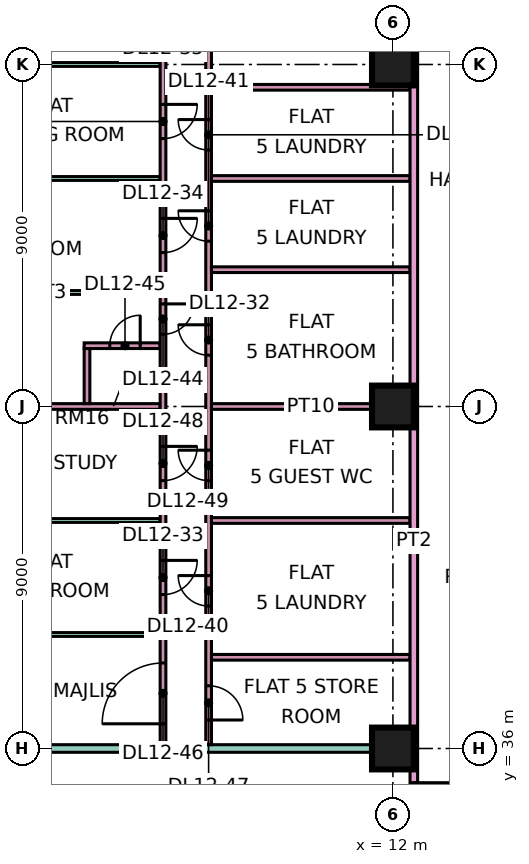
"""IFC4 building model, lengths in metres.
Left out: names, types, materials, properties, quantities, classifications, styles, units other than length and angle.
Written with IfcOpenShell. Run it as: python <this file> out.ifc"""

import sys

from ifc_helpers import new_model, si_unit, direction, frame, frame_2d, origin, origin_2d, place, context, subcontext, project, spatial, rectangle, extrude, element, fill, save


model = new_model("IFC4")
c1 = context("Model", 3, precision=1e-05, world=origin(), true_north=direction((0.0, 1.0)))
c2 = subcontext(c1, "Body", "Model", "MODEL_VIEW")
j1 = project(units=[si_unit("LENGTHUNIT", "METRE"), si_unit("PLANEANGLEUNIT", "RADIAN")], contexts=[c1])
p1 = place(None, origin())
s1 = spatial("IfcSite", under=j1, at=p1, CompositionType="ELEMENT")
p2 = place(p1, origin())
s2 = spatial("IfcBuilding", under=s1, at=p2, CompositionType="ELEMENT")
p3 = place(p2, frame((0.0, 0.0, 60.15)))
s3 = spatial("IfcBuildingStorey", under=s2, at=p3, CompositionType="ELEMENT", Elevation=60.15)
for number, where, z_axis, x_axis in (
    (1, (12.0, 36.0, 0.0), (0.0, 0.0, 1.0), (1.0, 0.0, 0.0)),
    (2, (12.0, 45.0, 0.0), (0.0, 0.0, 1.0), (1.0, 0.0, 0.0)),
    (3, (12.0, 54.0, 0.0), (0.0, 0.0, 1.0), (1.0, 0.0, 0.0)),
):
    element("IfcColumn", number, at=place(p3, frame(where, z_axis=z_axis, x_axis=x_axis)), inside=s3, PredefinedType="COLUMN", context=c2, shape_type="SweptSolid", body=[
        extrude(rectangle(XDim=1.1, YDim=1.1, at=origin_2d()), origin(), (0.0, 0.0, 1.0), 3.75),
    ])
p4 = place(p3, frame((0.0, 36.0, 0.0), z_axis=(0.0, 0.0, 1.0), x_axis=(1.0, 0.0, 0.0)))
e4 = element("IfcWall", 4, at=p4, inside=s3, PredefinedType="PARTITIONING", context=c2, shape_type="SweptSolid", body=[
    extrude(rectangle(XDim=12.45, YDim=0.2, at=frame_2d((6.225, 0.0))), origin(), (0.0, 0.0, 1.0), 3.35),
])
p5 = place(p3, frame((0.0, 48.0, 0.0), z_axis=(0.0, 0.0, 1.0), x_axis=(1.0, 0.0, 0.0)))
e5 = element("IfcWall", 5, at=p5, inside=s3, PredefinedType="PARTITIONING", context=c2, shape_type="SweptSolid", body=[
    extrude(rectangle(XDim=5.875, YDim=0.1, at=frame_2d((2.938, 0.0))), origin(), (0.0, 0.0, 1.0), 3.35),
])
p6 = place(p3, frame((-1.35, 51.0, 0.0), z_axis=(0.0, 0.0, 1.0), x_axis=(1.0, 0.0, 0.0)))
e6 = element("IfcWall", 6, at=p6, inside=s3, PredefinedType="PARTITIONING", context=c2, shape_type="SweptSolid", body=[
    extrude(rectangle(XDim=7.225, YDim=0.1, at=frame_2d((3.613, 0.0))), origin(), (0.0, 0.0, 1.0), 3.35),
])
p7 = place(p3, frame((0.0, 54.0, 0.0), z_axis=(0.0, 0.0, 1.0), x_axis=(1.0, 0.0, 0.0)))
e7 = element("IfcWall", 7, at=p7, inside=s3, PredefinedType="PARTITIONING", context=c2, shape_type="SweptSolid", body=[
    extrude(rectangle(XDim=5.875, YDim=0.1, at=frame_2d((2.938, 0.0))), origin(), (0.0, 0.0, 1.0), 3.35),
])
for number, where, z_axis, x_axis in (
    (8, (0.074, 39.0, 0.0), (0.0, 0.0, 1.0), (1.0, 0.0, 0.0)),
    (9, (0.074, 42.0, 0.0), (0.0, 0.0, 1.0), (1.0, 0.0, 0.0)),
):
    element("IfcWall", number, at=place(p3, frame(where, z_axis=z_axis, x_axis=x_axis)), inside=s3, PredefinedType="PARTITIONING", context=c2, shape_type="SweptSolid", body=[
        extrude(rectangle(XDim=5.801, YDim=0.1, at=frame_2d((2.9, 0.0))), origin(), (0.0, 0.0, 1.0), 3.35),
    ])
p8 = place(p3, frame((0.074, 45.0, 0.0), z_axis=(0.0, 0.0, 1.0), x_axis=(1.0, 0.0, 0.0)))
e10 = element("IfcWall", 10, at=p8, inside=s3, PredefinedType="PARTITIONING", context=c2, shape_type="SweptSolid", body=[
    extrude(rectangle(XDim=5.801, YDim=0.15, at=frame_2d((2.9, 0.0))), origin(), (0.0, 0.0, 1.0), 3.35),
])
p9 = place(p3, frame((3.875, 46.6, 0.0), z_axis=(0.0, 0.0, 1.0), x_axis=(1.0, 0.0, 0.0)))
e11 = element("IfcWall", 11, at=p9, inside=s3, PredefinedType="PARTITIONING", context=c2, shape_type="SweptSolid", body=[
    extrude(rectangle(XDim=2.0, YDim=0.15, at=frame_2d((1.0, 0.0))), origin(), (0.0, 0.0, 1.0), 3.35),
])
p10 = place(p9, frame((0.675, 0.0, 0.0)))
e12 = element("IfcOpeningElement", 12, at=p10, cuts=e11, PredefinedType="OPENING", context=c2, shape_type="SweptSolid", body=[
    extrude(rectangle(XDim=0.8, YDim=2.1, at=frame_2d((0.4, 1.05))), frame((0.0, 0.085, 0.0), z_axis=(0.0, -1.0, 0.0), x_axis=(1.0, 0.0, 0.0)), (0.0, 0.0, 1.0), 0.17),
])
p11 = place(p3, frame((3.95, 45.075, 0.0), z_axis=(0.0, 0.0, 1.0), x_axis=(0.0, 1.0, 0.0)))
e13 = element("IfcWall", 13, at=p11, inside=s3, PredefinedType="PARTITIONING", context=c2, shape_type="SweptSolid", body=[
    extrude(rectangle(XDim=1.45, YDim=0.15, at=frame_2d((0.725, 0.0))), origin(), (0.0, 0.0, 1.0), 3.35),
])
p12 = place(p3, frame((5.95, 36.1, 0.0), z_axis=(0.0, 0.0, 1.0), x_axis=(0.0, 1.0, 0.0)))
e14 = element("IfcWall", 14, at=p12, inside=s3, PredefinedType="PARTITIONING", context=c2, shape_type="SweptSolid", body=[
    extrude(rectangle(XDim=28.25, YDim=0.15, at=frame_2d((14.125, 0.0))), origin(), (0.0, 0.0, 1.0), 3.35),
])
p13 = place(p12, frame((3.95, 0.0, 0.0)))
e15 = element("IfcOpeningElement", 15, at=p13, cuts=e14, PredefinedType="OPENING", context=c2, shape_type="SweptSolid", body=[
    extrude(rectangle(XDim=0.9, YDim=2.1, at=frame_2d((0.45, 1.05))), frame((0.0, 0.085, 0.0), z_axis=(0.0, -1.0, 0.0), x_axis=(1.0, 0.0, 0.0)), (0.0, 0.0, 1.0), 0.17),
])
p14 = place(p12, frame((12.95, 0.0, 0.0)))
e16 = element("IfcOpeningElement", 16, at=p14, cuts=e14, PredefinedType="OPENING", context=c2, shape_type="SweptSolid", body=[
    extrude(rectangle(XDim=0.9, YDim=2.1, at=frame_2d((0.45, 1.05))), frame((0.0, 0.085, 0.0), z_axis=(0.0, -1.0, 0.0), x_axis=(1.0, 0.0, 0.0)), (0.0, 0.0, 1.0), 0.17),
])
p15 = place(p12, frame((18.95, 0.0, 0.0)))
e17 = element("IfcOpeningElement", 17, at=p15, cuts=e14, PredefinedType="OPENING", context=c2, shape_type="SweptSolid", body=[
    extrude(rectangle(XDim=0.9, YDim=2.1, at=frame_2d((0.45, 1.05))), frame((0.0, 0.085, 0.0), z_axis=(0.0, -1.0, 0.0), x_axis=(1.0, 0.0, 0.0)), (0.0, 0.0, 1.0), 0.17),
])
p16 = place(p12, frame((21.95, 0.0, 0.0)))
e18 = element("IfcOpeningElement", 18, at=p16, cuts=e14, PredefinedType="OPENING", context=c2, shape_type="SweptSolid", body=[
    extrude(rectangle(XDim=0.9, YDim=2.1, at=frame_2d((0.45, 1.05))), frame((0.0, 0.085, 0.0), z_axis=(0.0, -1.0, 0.0), x_axis=(1.0, 0.0, 0.0)), (0.0, 0.0, 1.0), 0.17),
])
p17 = place(p12, frame((24.95, 0.0, 0.0)))
e19 = element("IfcOpeningElement", 19, at=p17, cuts=e14, PredefinedType="OPENING", context=c2, shape_type="SweptSolid", body=[
    extrude(rectangle(XDim=0.9, YDim=2.1, at=frame_2d((0.45, 1.05))), frame((0.0, 0.085, 0.0), z_axis=(0.0, -1.0, 0.0), x_axis=(1.0, 0.0, 0.0)), (0.0, 0.0, 1.0), 0.17),
])
p18 = place(p12, frame((15.95, 0.0, 0.0)))
e20 = element("IfcOpeningElement", 20, at=p18, cuts=e14, PredefinedType="OPENING", context=c2, shape_type="SweptSolid", body=[
    extrude(rectangle(XDim=0.9, YDim=2.1, at=frame_2d((0.45, 1.05))), frame((0.0, 0.085, 0.0), z_axis=(0.0, -1.0, 0.0), x_axis=(1.0, 0.0, 0.0)), (0.0, 0.0, 1.0), 0.17),
])
p19 = place(p12, frame((10.8, 0.0, 0.0)))
e21 = element("IfcOpeningElement", 21, at=p19, cuts=e14, PredefinedType="OPENING", context=c2, shape_type="SweptSolid", body=[
    extrude(rectangle(XDim=0.8, YDim=2.1, at=frame_2d((0.4, 1.05))), frame((0.0, 0.085, 0.0), z_axis=(0.0, -1.0, 0.0), x_axis=(1.0, 0.0, 0.0)), (0.0, 0.0, 1.0), 0.17),
])
p20 = place(p12, frame((0.55, 0.0, 0.0)))
e22 = element("IfcOpeningElement", 22, at=p20, cuts=e14, PredefinedType="OPENING", context=c2, shape_type="SweptSolid", body=[
    extrude(rectangle(XDim=1.6, YDim=2.1, at=frame_2d((0.8, 1.05))), frame((0.0, 0.085, 0.0), z_axis=(0.0, -1.0, 0.0), x_axis=(1.0, 0.0, 0.0)), (0.0, 0.0, 1.0), 0.17),
])
p21 = place(p12, frame((6.95, 0.0, 0.0)))
e23 = element("IfcOpeningElement", 23, at=p21, cuts=e14, PredefinedType="OPENING", context=c2, shape_type="SweptSolid", body=[
    extrude(rectangle(XDim=0.9, YDim=2.1, at=frame_2d((0.45, 1.05))), frame((0.0, 0.085, 0.0), z_axis=(0.0, -1.0, 0.0), x_axis=(1.0, 0.0, 0.0)), (0.0, 0.0, 1.0), 0.17),
])
p22 = place(p3, frame((7.15, 36.1, 0.0), z_axis=(0.0, 0.0, 1.0), x_axis=(0.0, 1.0, 0.0)))
e24 = element("IfcWall", 24, at=p22, inside=s3, PredefinedType="PARTITIONING", context=c2, shape_type="SweptSolid", body=[
    extrude(rectangle(XDim=23.35, YDim=0.15, at=frame_2d((11.675, 0.0))), origin(), (0.0, 0.0, 1.0), 3.35),
])
p23 = place(p22, frame((10.25, 0.0, 0.0)))
e25 = element("IfcOpeningElement", 25, at=p23, cuts=e24, PredefinedType="OPENING", context=c2, shape_type="SweptSolid", body=[
    extrude(rectangle(XDim=0.8, YDim=2.1, at=frame_2d((0.4, 1.05))), frame((0.0, 0.085, 0.0), z_axis=(0.0, -1.0, 0.0), x_axis=(1.0, 0.0, 0.0)), (0.0, 0.0, 1.0), 0.17),
])
p24 = place(p22, frame((19.85, 0.0, 0.0)))
e26 = element("IfcOpeningElement", 26, at=p24, cuts=e24, PredefinedType="OPENING", context=c2, shape_type="SweptSolid", body=[
    extrude(rectangle(XDim=0.9, YDim=2.1, at=frame_2d((0.45, 1.05))), frame((0.0, 0.085, 0.0), z_axis=(0.0, -1.0, 0.0), x_axis=(1.0, 0.0, 0.0)), (0.0, 0.0, 1.0), 0.17),
])
p25 = place(p22, frame((3.65, 0.0, 0.0)))
e27 = element("IfcOpeningElement", 27, at=p25, cuts=e24, PredefinedType="OPENING", context=c2, shape_type="SweptSolid", body=[
    extrude(rectangle(XDim=0.8, YDim=2.1, at=frame_2d((0.4, 1.05))), frame((0.0, 0.085, 0.0), z_axis=(0.0, -1.0, 0.0), x_axis=(1.0, 0.0, 0.0)), (0.0, 0.0, 1.0), 0.17),
])
p26 = place(p22, frame((13.25, 0.0, 0.0)))
e28 = element("IfcOpeningElement", 28, at=p26, cuts=e24, PredefinedType="OPENING", context=c2, shape_type="SweptSolid", body=[
    extrude(rectangle(XDim=0.8, YDim=2.1, at=frame_2d((0.4, 1.05))), frame((0.0, 0.085, 0.0), z_axis=(0.0, -1.0, 0.0), x_axis=(1.0, 0.0, 0.0)), (0.0, 0.0, 1.0), 0.17),
])
p27 = place(p22, frame((15.65, 0.0, 0.0)))
e29 = element("IfcOpeningElement", 29, at=p27, cuts=e24, PredefinedType="OPENING", context=c2, shape_type="SweptSolid", body=[
    extrude(rectangle(XDim=0.8, YDim=2.1, at=frame_2d((0.4, 1.05))), frame((0.0, 0.085, 0.0), z_axis=(0.0, -1.0, 0.0), x_axis=(1.0, 0.0, 0.0)), (0.0, 0.0, 1.0), 0.17),
])
p28 = place(p22, frame((0.65, 0.0, 0.0)))
e30 = element("IfcOpeningElement", 30, at=p28, cuts=e24, PredefinedType="OPENING", context=c2, shape_type="SweptSolid", body=[
    extrude(rectangle(XDim=0.9, YDim=2.1, at=frame_2d((0.45, 1.05))), frame((0.0, 0.085, 0.0), z_axis=(0.0, -1.0, 0.0), x_axis=(1.0, 0.0, 0.0)), (0.0, 0.0, 1.0), 0.17),
])
p29 = place(p22, frame((6.95, 0.0, 0.0)))
e31 = element("IfcOpeningElement", 31, at=p29, cuts=e24, PredefinedType="OPENING", context=c2, shape_type="SweptSolid", body=[
    extrude(rectangle(XDim=0.8, YDim=2.1, at=frame_2d((0.4, 1.05))), frame((0.0, 0.085, 0.0), z_axis=(0.0, -1.0, 0.0), x_axis=(1.0, 0.0, 0.0)), (0.0, 0.0, 1.0), 0.17),
])
for number, where, z_axis, x_axis in (
    (32, (7.225, 38.4, 0.0), (0.0, 0.0, 1.0), (1.0, 0.0, 0.0)),
    (33, (7.225, 42.0, 0.0), (0.0, 0.0, 1.0), (1.0, 0.0, 0.0)),
    (34, (7.225, 45.0, 0.0), (0.0, 0.0, 1.0), (1.0, 0.0, 0.0)),
    (35, (7.225, 48.6, 0.0), (0.0, 0.0, 1.0), (1.0, 0.0, 0.0)),
    (36, (7.225, 51.0, 0.0), (0.0, 0.0, 1.0), (1.0, 0.0, 0.0)),
    (37, (7.225, 53.4, 0.0), (0.0, 0.0, 1.0), (1.0, 0.0, 0.0)),
):
    element("IfcWall", number, at=place(p3, frame(where, z_axis=z_axis, x_axis=x_axis)), inside=s3, PredefinedType="PARTITIONING", context=c2, shape_type="SweptSolid", body=[
        extrude(rectangle(XDim=5.225, YDim=0.15, at=frame_2d((2.612, 0.0))), origin(), (0.0, 0.0, 1.0), 3.35),
    ])
p30 = place(p3, frame((12.55, 20.0, 0.0), z_axis=(0.0, 0.0, 1.0), x_axis=(0.0, 1.0, 0.0)))
e38 = element("IfcWall", 38, at=p30, inside=s3, PredefinedType="PARTITIONING", context=c2, shape_type="SweptSolid", body=[
    extrude(rectangle(XDim=42.926, YDim=0.2, at=frame_2d((21.463, 0.0))), origin(), (0.0, 0.0, 1.0), 3.35),
])
p31 = place(p30, frame((40.65, 0.0, 0.0)))
e39 = element("IfcOpeningElement", 39, at=p31, cuts=e38, PredefinedType="OPENING", context=c2, shape_type="SweptSolid", body=[
    extrude(rectangle(XDim=1.0, YDim=2.1, at=frame_2d((0.5, 1.05))), frame((0.0, 0.11, 0.0), z_axis=(0.0, -1.0, 0.0), x_axis=(1.0, 0.0, 0.0)), (0.0, 0.0, 1.0), 0.22),
])
p32 = place(p30, frame((0.6, 0.0, 0.0)))
e40 = element("IfcOpeningElement", 40, at=p32, cuts=e38, PredefinedType="OPENING", context=c2, shape_type="SweptSolid", body=[
    extrude(rectangle(XDim=1.2, YDim=2.1, at=frame_2d((0.6, 1.05))), frame((0.0, 0.11, 0.0), z_axis=(0.0, -1.0, 0.0), x_axis=(1.0, 0.0, 0.0)), (0.0, 0.0, 1.0), 0.22),
])
p33 = place(p30, frame((14.1, 0.0, 0.0)))
e41 = element("IfcOpeningElement", 41, at=p33, cuts=e38, PredefinedType="OPENING", context=c2, shape_type="SweptSolid", body=[
    extrude(rectangle(XDim=1.0, YDim=2.1, at=frame_2d((0.5, 1.05))), frame((0.0, 0.11, 0.0), z_axis=(0.0, -1.0, 0.0), x_axis=(1.0, 0.0, 0.0)), (0.0, 0.0, 1.0), 0.22),
])
p34 = place(p23, frame((0.8, 0.0, 0.0), z_axis=(0.0, 0.0, 1.0), x_axis=(-1.0, 0.0, 0.0)))
e42 = element("IfcDoor", 42, at=p34, inside=s3, OperationType="SINGLE_SWING_RIGHT", PredefinedType="DOOR", context=c2, shape_type="SweptSolid", body=[
    extrude(rectangle(XDim=0.8, YDim=2.1, at=frame_2d((0.4, 1.05))), frame((0.0, 0.025, 0.0), z_axis=(0.0, -1.0, 0.0), x_axis=(1.0, 0.0, 0.0)), (0.0, 0.0, 1.0), 0.05),
])
fill(e25, e42)
p35 = place(p13, origin())
e43 = element("IfcDoor", 43, at=p35, inside=s3, OperationType="SINGLE_SWING_RIGHT", PredefinedType="DOOR", context=c2, shape_type="SweptSolid", body=[
    extrude(rectangle(XDim=0.9, YDim=2.1, at=frame_2d((0.45, 1.05))), frame((0.0, 0.025, 0.0), z_axis=(0.0, -1.0, 0.0), x_axis=(1.0, 0.0, 0.0)), (0.0, 0.0, 1.0), 0.05),
])
fill(e15, e43)
p36 = place(p14, origin())
e44 = element("IfcDoor", 44, at=p36, inside=s3, OperationType="SINGLE_SWING_RIGHT", PredefinedType="DOOR", context=c2, shape_type="SweptSolid", body=[
    extrude(rectangle(XDim=0.9, YDim=2.1, at=frame_2d((0.45, 1.05))), frame((0.0, 0.025, 0.0), z_axis=(0.0, -1.0, 0.0), x_axis=(1.0, 0.0, 0.0)), (0.0, 0.0, 1.0), 0.05),
])
fill(e16, e44)
p37 = place(p25, frame((0.8, 0.0, 0.0), z_axis=(0.0, 0.0, 1.0), x_axis=(-1.0, 0.0, 0.0)))
e45 = element("IfcDoor", 45, at=p37, inside=s3, OperationType="SINGLE_SWING_RIGHT", PredefinedType="DOOR", context=c2, shape_type="SweptSolid", body=[
    extrude(rectangle(XDim=0.8, YDim=2.1, at=frame_2d((0.4, 1.05))), frame((0.0, 0.025, 0.0), z_axis=(0.0, -1.0, 0.0), x_axis=(1.0, 0.0, 0.0)), (0.0, 0.0, 1.0), 0.05),
])
fill(e27, e45)
p38 = place(p26, frame((0.8, 0.0, 0.0), z_axis=(0.0, 0.0, 1.0), x_axis=(-1.0, 0.0, 0.0)))
e46 = element("IfcDoor", 46, at=p38, inside=s3, OperationType="SINGLE_SWING_RIGHT", PredefinedType="DOOR", context=c2, shape_type="SweptSolid", body=[
    extrude(rectangle(XDim=0.8, YDim=2.1, at=frame_2d((0.4, 1.05))), frame((0.0, 0.025, 0.0), z_axis=(0.0, -1.0, 0.0), x_axis=(1.0, 0.0, 0.0)), (0.0, 0.0, 1.0), 0.05),
])
fill(e28, e46)
p39 = place(p27, frame((0.8, 0.0, 0.0), z_axis=(0.0, 0.0, 1.0), x_axis=(-1.0, 0.0, 0.0)))
e47 = element("IfcDoor", 47, at=p39, inside=s3, OperationType="SINGLE_SWING_RIGHT", PredefinedType="DOOR", context=c2, shape_type="SweptSolid", body=[
    extrude(rectangle(XDim=0.8, YDim=2.1, at=frame_2d((0.4, 1.05))), frame((0.0, 0.025, 0.0), z_axis=(0.0, -1.0, 0.0), x_axis=(1.0, 0.0, 0.0)), (0.0, 0.0, 1.0), 0.05),
])
fill(e29, e47)
p40 = place(p18, origin())
e48 = element("IfcDoor", 48, at=p40, inside=s3, OperationType="SINGLE_SWING_RIGHT", PredefinedType="DOOR", context=c2, shape_type="SweptSolid", body=[
    extrude(rectangle(XDim=0.9, YDim=2.1, at=frame_2d((0.45, 1.05))), frame((0.0, 0.025, 0.0), z_axis=(0.0, -1.0, 0.0), x_axis=(1.0, 0.0, 0.0)), (0.0, 0.0, 1.0), 0.05),
])
fill(e20, e48)
p41 = place(p19, origin())
e49 = element("IfcDoor", 49, at=p41, inside=s3, OperationType="SINGLE_SWING_RIGHT", PredefinedType="DOOR", context=c2, shape_type="SweptSolid", body=[
    extrude(rectangle(XDim=0.8, YDim=2.1, at=frame_2d((0.4, 1.05))), frame((0.0, 0.025, 0.0), z_axis=(0.0, -1.0, 0.0), x_axis=(1.0, 0.0, 0.0)), (0.0, 0.0, 1.0), 0.05),
])
fill(e21, e49)
p42 = place(p10, frame((0.8, 0.0, 0.0), z_axis=(0.0, 0.0, 1.0), x_axis=(-1.0, 0.0, 0.0)))
e50 = element("IfcDoor", 50, at=p42, inside=s3, OperationType="SINGLE_SWING_RIGHT", PredefinedType="DOOR", context=c2, shape_type="SweptSolid", body=[
    extrude(rectangle(XDim=0.8, YDim=2.1, at=frame_2d((0.4, 1.05))), frame((0.0, 0.025, 0.0), z_axis=(0.0, -1.0, 0.0), x_axis=(1.0, 0.0, 0.0)), (0.0, 0.0, 1.0), 0.05),
])
fill(e12, e50)
p43 = place(p20, origin())
e51 = element("IfcDoor", 51, at=p43, inside=s3, OperationType="DOUBLE_DOOR_SINGLE_SWING", PredefinedType="DOOR", context=c2, shape_type="SweptSolid", body=[
    extrude(rectangle(XDim=1.6, YDim=2.1, at=frame_2d((0.8, 1.05))), frame((0.0, 0.025, 0.0), z_axis=(0.0, -1.0, 0.0), x_axis=(1.0, 0.0, 0.0)), (0.0, 0.0, 1.0), 0.05),
])
fill(e22, e51)
p44 = place(p28, frame((0.9, 0.0, 0.0), z_axis=(0.0, 0.0, 1.0), x_axis=(-1.0, 0.0, 0.0)))
e52 = element("IfcDoor", 52, at=p44, inside=s3, OperationType="SINGLE_SWING_LEFT", PredefinedType="DOOR", context=c2, shape_type="SweptSolid", body=[
    extrude(rectangle(XDim=0.9, YDim=2.1, at=frame_2d((0.45, 1.05))), frame((0.0, 0.025, 0.0), z_axis=(0.0, -1.0, 0.0), x_axis=(1.0, 0.0, 0.0)), (0.0, 0.0, 1.0), 0.05),
])
fill(e30, e52)
p45 = place(p21, origin())
e53 = element("IfcDoor", 53, at=p45, inside=s3, OperationType="SINGLE_SWING_RIGHT", PredefinedType="DOOR", context=c2, shape_type="SweptSolid", body=[
    extrude(rectangle(XDim=0.9, YDim=2.1, at=frame_2d((0.45, 1.05))), frame((0.0, 0.025, 0.0), z_axis=(0.0, -1.0, 0.0), x_axis=(1.0, 0.0, 0.0)), (0.0, 0.0, 1.0), 0.05),
])
fill(e23, e53)
p46 = place(p29, frame((0.8, 0.0, 0.0), z_axis=(0.0, 0.0, 1.0), x_axis=(-1.0, 0.0, 0.0)))
e54 = element("IfcDoor", 54, at=p46, inside=s3, OperationType="SINGLE_SWING_RIGHT", PredefinedType="DOOR", context=c2, shape_type="SweptSolid", body=[
    extrude(rectangle(XDim=0.8, YDim=2.1, at=frame_2d((0.4, 1.05))), frame((0.0, 0.025, 0.0), z_axis=(0.0, -1.0, 0.0), x_axis=(1.0, 0.0, 0.0)), (0.0, 0.0, 1.0), 0.05),
])
fill(e31, e54)
p47 = place(p33, origin())
e55 = element("IfcDoor", 55, at=p47, inside=s3, OperationType="SINGLE_SWING_RIGHT", PredefinedType="DOOR", context=c2, shape_type="SweptSolid", body=[
    extrude(rectangle(XDim=1.0, YDim=2.1, at=frame_2d((0.5, 1.05))), frame((0.0, 0.025, 0.0), z_axis=(0.0, -1.0, 0.0), x_axis=(1.0, 0.0, 0.0)), (0.0, 0.0, 1.0), 0.05),
])
fill(e41, e55)
save(model, sys.argv[1])
